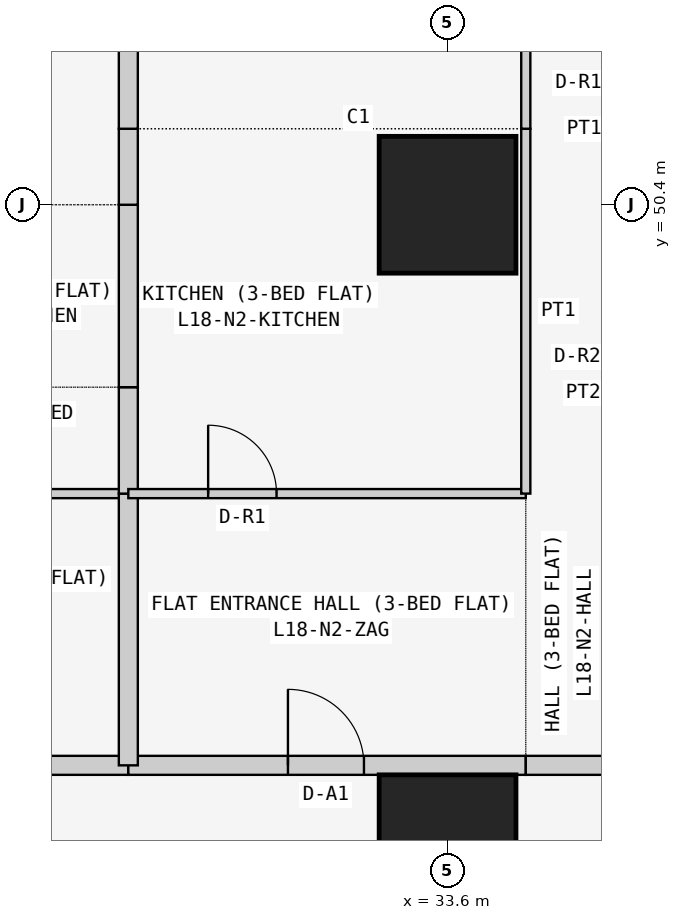
"""IFC4 building model, lengths in metres.
Left out: names, types, materials, properties, quantities, classifications, styles, units other than length and angle.
Written with IfcOpenShell. Run it as: python <this file> out.ifc"""

import sys

from ifc_helpers import new_model, si_unit, direction, frame, frame_2d, origin, origin_2d, place, context, subcontext, project, spatial, rectangle, extrude, element, fill, save


model = new_model("IFC4")
c1 = context("Model", 3, precision=1e-05, world=origin(), true_north=direction((0.0, 1.0)))
c2 = subcontext(c1, "Body", "Model", "MODEL_VIEW")
j1 = project(units=[si_unit("LENGTHUNIT", "METRE"), si_unit("PLANEANGLEUNIT", "RADIAN")], contexts=[c1])
p1 = place(None, origin())
s1 = spatial("IfcSite", under=j1, at=p1, CompositionType="ELEMENT")
p2 = place(p1, origin())
s2 = spatial("IfcBuilding", under=s1, at=p2, CompositionType="ELEMENT")
p3 = place(p2, frame((0.0, 0.0, 74.1)))
s3 = spatial("IfcBuildingStorey", under=s2, at=p3, CompositionType="ELEMENT", Elevation=74.1)
for number, where, z_axis, x_axis in (
    (1, (33.6, 42.0, 0.0), (0.0, 0.0, 1.0), (1.0, 0.0, 0.0)),
    (2, (33.6, 50.4, 0.0), (0.0, 0.0, 1.0), (1.0, 0.0, 0.0)),
):
    element("IfcColumn", number, at=place(p3, frame(where, z_axis=z_axis, x_axis=x_axis)), inside=s3, PredefinedType="COLUMN", context=c2, shape_type="SweptSolid", body=[
        extrude(rectangle(XDim=1.8, YDim=1.8, at=origin_2d()), origin(), (0.0, 0.0, 1.0), 3.6),
    ])
p4 = place(p3, frame((24.171, 43.025, 0.0), z_axis=(0.0, 0.0, 1.0), x_axis=(1.0, 0.0, 0.0)))
e3 = element("IfcWall", 3, at=p4, inside=s3, PredefinedType="PARTITIONING", context=c2, shape_type="SweptSolid", body=[
    extrude(rectangle(XDim=5.229, YDim=0.25, at=frame_2d((2.615, 0.0))), origin(), (0.0, 0.0, 1.0), 3.45),
])
p5 = place(p4, frame((2.129, 0.0, 0.0)))
e4 = element("IfcOpeningElement", 4, at=p5, cuts=e3, PredefinedType="OPENING", context=c2, shape_type="SweptSolid", body=[
    extrude(rectangle(XDim=1.0, YDim=2.1, at=frame_2d((0.5, 1.05))), frame((0.0, 0.135, 0.0), z_axis=(0.0, -1.0, 0.0), x_axis=(1.0, 0.0, 0.0)), (0.0, 0.0, 1.0), 0.27),
])
p6 = place(p3, frame((29.4, 43.025, 0.0), z_axis=(0.0, 0.0, 1.0), x_axis=(1.0, 0.0, 0.0)))
e5 = element("IfcWall", 5, at=p6, inside=s3, PredefinedType="PARTITIONING", context=c2, shape_type="SweptSolid", body=[
    extrude(rectangle(XDim=5.229, YDim=0.25, at=frame_2d((2.615, 0.0))), origin(), (0.0, 0.0, 1.0), 3.45),
])
p7 = place(p6, frame((2.1, 0.0, 0.0)))
e6 = element("IfcOpeningElement", 6, at=p7, cuts=e5, PredefinedType="OPENING", context=c2, shape_type="SweptSolid", body=[
    extrude(rectangle(XDim=1.0, YDim=2.1, at=frame_2d((0.5, 1.05))), frame((0.0, 0.135, 0.0), z_axis=(0.0, -1.0, 0.0), x_axis=(1.0, 0.0, 0.0)), (0.0, 0.0, 1.0), 0.27),
])
p8 = place(p3, frame((34.629, 43.025, 0.0), z_axis=(0.0, 0.0, 1.0), x_axis=(1.0, 0.0, 0.0)))
e7 = element("IfcWall", 7, at=p8, inside=s3, PredefinedType="PARTITIONING", context=c2, shape_type="SweptSolid", body=[
    extrude(rectangle(XDim=1.2, YDim=0.25, at=frame_2d((0.6, 0.0))), origin(), (0.0, 0.0, 1.0), 3.45),
])
p9 = place(p3, frame((29.4, 46.6, 0.0), z_axis=(0.0, 0.0, 1.0), x_axis=(-1.0, 0.0, 0.0)))
e8 = element("IfcWall", 8, at=p9, inside=s3, PredefinedType="PARTITIONING", context=c2, shape_type="SweptSolid", body=[
    extrude(rectangle(XDim=5.229, YDim=0.12, at=frame_2d((2.615, 0.0))), origin(), (0.0, 0.0, 1.0), 3.45),
])
p10 = place(p3, frame((29.4, 43.025, 0.0), z_axis=(0.0, 0.0, 1.0), x_axis=(0.0, 1.0, 0.0)))
e9 = element("IfcWall", 9, at=p10, inside=s3, PredefinedType="PARTITIONING", context=c2, shape_type="SweptSolid", body=[
    extrude(rectangle(XDim=3.575, YDim=0.25, at=frame_2d((1.788, 0.0))), origin(), (0.0, 0.0, 1.0), 2.848),
])
p11 = place(p3, frame((29.4, 46.6, 0.0), z_axis=(0.0, 0.0, 1.0), x_axis=(0.0, 1.0, 0.0)))
e10 = element("IfcWall", 10, at=p11, inside=s3, PredefinedType="PARTITIONING", context=c2, shape_type="SweptSolid", body=[
    extrude(rectangle(XDim=1.4, YDim=0.25, at=frame_2d((0.7, 0.0))), origin(), (0.0, 0.0, 1.0), 2.848),
])
p12 = place(p3, frame((29.4, 48.0, 0.0), z_axis=(0.0, 0.0, 1.0), x_axis=(0.0, 1.0, 0.0)))
e11 = element("IfcWall", 11, at=p12, inside=s3, PredefinedType="PARTITIONING", context=c2, shape_type="SweptSolid", body=[
    extrude(rectangle(XDim=2.4, YDim=0.25, at=frame_2d((1.2, 0.0))), origin(), (0.0, 0.0, 1.0), 2.848),
])
p13 = place(p3, frame((29.4, 50.4, 0.0), z_axis=(0.0, 0.0, 1.0), x_axis=(0.0, 1.0, 0.0)))
e12 = element("IfcWall", 12, at=p13, inside=s3, PredefinedType="PARTITIONING", context=c2, shape_type="SweptSolid", body=[
    extrude(rectangle(XDim=1.0, YDim=0.25, at=frame_2d((0.5, 0.0))), origin(), (0.0, 0.0, 1.0), 2.848),
])
p14 = place(p3, frame((29.4, 51.4, 0.0), z_axis=(0.0, 0.0, 1.0), x_axis=(0.0, 1.0, 0.0)))
e13 = element("IfcWall", 13, at=p14, inside=s3, PredefinedType="PARTITIONING", context=c2, shape_type="SweptSolid", body=[
    extrude(rectangle(XDim=8.05, YDim=0.25, at=frame_2d((4.025, 0.0))), origin(), (0.0, 0.0, 1.0), 2.848),
])
p15 = place(p3, frame((29.4, 46.6, 0.0), z_axis=(0.0, 0.0, 1.0), x_axis=(1.0, 0.0, 0.0)))
e14 = element("IfcWall", 14, at=p15, inside=s3, PredefinedType="PARTITIONING", context=c2, shape_type="SweptSolid", body=[
    extrude(rectangle(XDim=5.229, YDim=0.12, at=frame_2d((2.615, 0.0))), origin(), (0.0, 0.0, 1.0), 3.45),
])
p16 = place(p15, frame((1.05, 0.0, 0.0)))
e15 = element("IfcOpeningElement", 15, at=p16, cuts=e14, PredefinedType="OPENING", context=c2, shape_type="SweptSolid", body=[
    extrude(rectangle(XDim=0.9, YDim=2.1, at=frame_2d((0.45, 1.05))), frame((0.0, 0.07, 0.0), z_axis=(0.0, -1.0, 0.0), x_axis=(1.0, 0.0, 0.0)), (0.0, 0.0, 1.0), 0.14),
])
p17 = place(p3, frame((34.629, 51.4, 0.0), z_axis=(0.0, 0.0, 1.0), x_axis=(0.0, -1.0, 0.0)))
e16 = element("IfcWall", 16, at=p17, inside=s3, PredefinedType="PARTITIONING", context=c2, shape_type="SweptSolid", body=[
    extrude(rectangle(XDim=4.8, YDim=0.12, at=frame_2d((2.4, 0.0))), origin(), (0.0, 0.0, 1.0), 3.45),
])
p18 = place(p3, frame((34.629, 55.3, 0.0), z_axis=(0.0, 0.0, 1.0), x_axis=(0.0, -1.0, 0.0)))
e17 = element("IfcWall", 17, at=p18, inside=s3, PredefinedType="PARTITIONING", context=c2, shape_type="SweptSolid", body=[
    extrude(rectangle(XDim=3.9, YDim=0.12, at=frame_2d((1.95, 0.0))), origin(), (0.0, 0.0, 1.0), 3.45),
])
p19 = place(p18, frame((0.75, 0.0, 0.0)))
e18 = element("IfcOpeningElement", 18, at=p19, cuts=e17, PredefinedType="OPENING", context=c2, shape_type="SweptSolid", body=[
    extrude(rectangle(XDim=0.9, YDim=2.1, at=frame_2d((0.45, 1.05))), frame((0.0, 0.07, 0.0), z_axis=(0.0, -1.0, 0.0), x_axis=(1.0, 0.0, 0.0)), (0.0, 0.0, 1.0), 0.14),
])
p20 = place(p7, origin())
e19 = element("IfcDoor", 19, at=p20, inside=s3, OperationType="SINGLE_SWING_LEFT", PredefinedType="DOOR", context=c2, shape_type="SweptSolid", body=[
    extrude(rectangle(XDim=1.0, YDim=2.1, at=frame_2d((0.5, 1.05))), frame((0.0, 0.025, 0.0), z_axis=(0.0, -1.0, 0.0), x_axis=(1.0, 0.0, 0.0)), (0.0, 0.0, 1.0), 0.05),
])
fill(e6, e19)
p21 = place(p16, origin())
e20 = element("IfcDoor", 20, at=p21, inside=s3, OperationType="SINGLE_SWING_LEFT", PredefinedType="DOOR", context=c2, shape_type="SweptSolid", body=[
    extrude(rectangle(XDim=0.9, YDim=2.1, at=frame_2d((0.45, 1.05))), frame((0.0, 0.025, 0.0), z_axis=(0.0, -1.0, 0.0), x_axis=(1.0, 0.0, 0.0)), (0.0, 0.0, 1.0), 0.05),
])
fill(e15, e20)
save(model, sys.argv[1])
